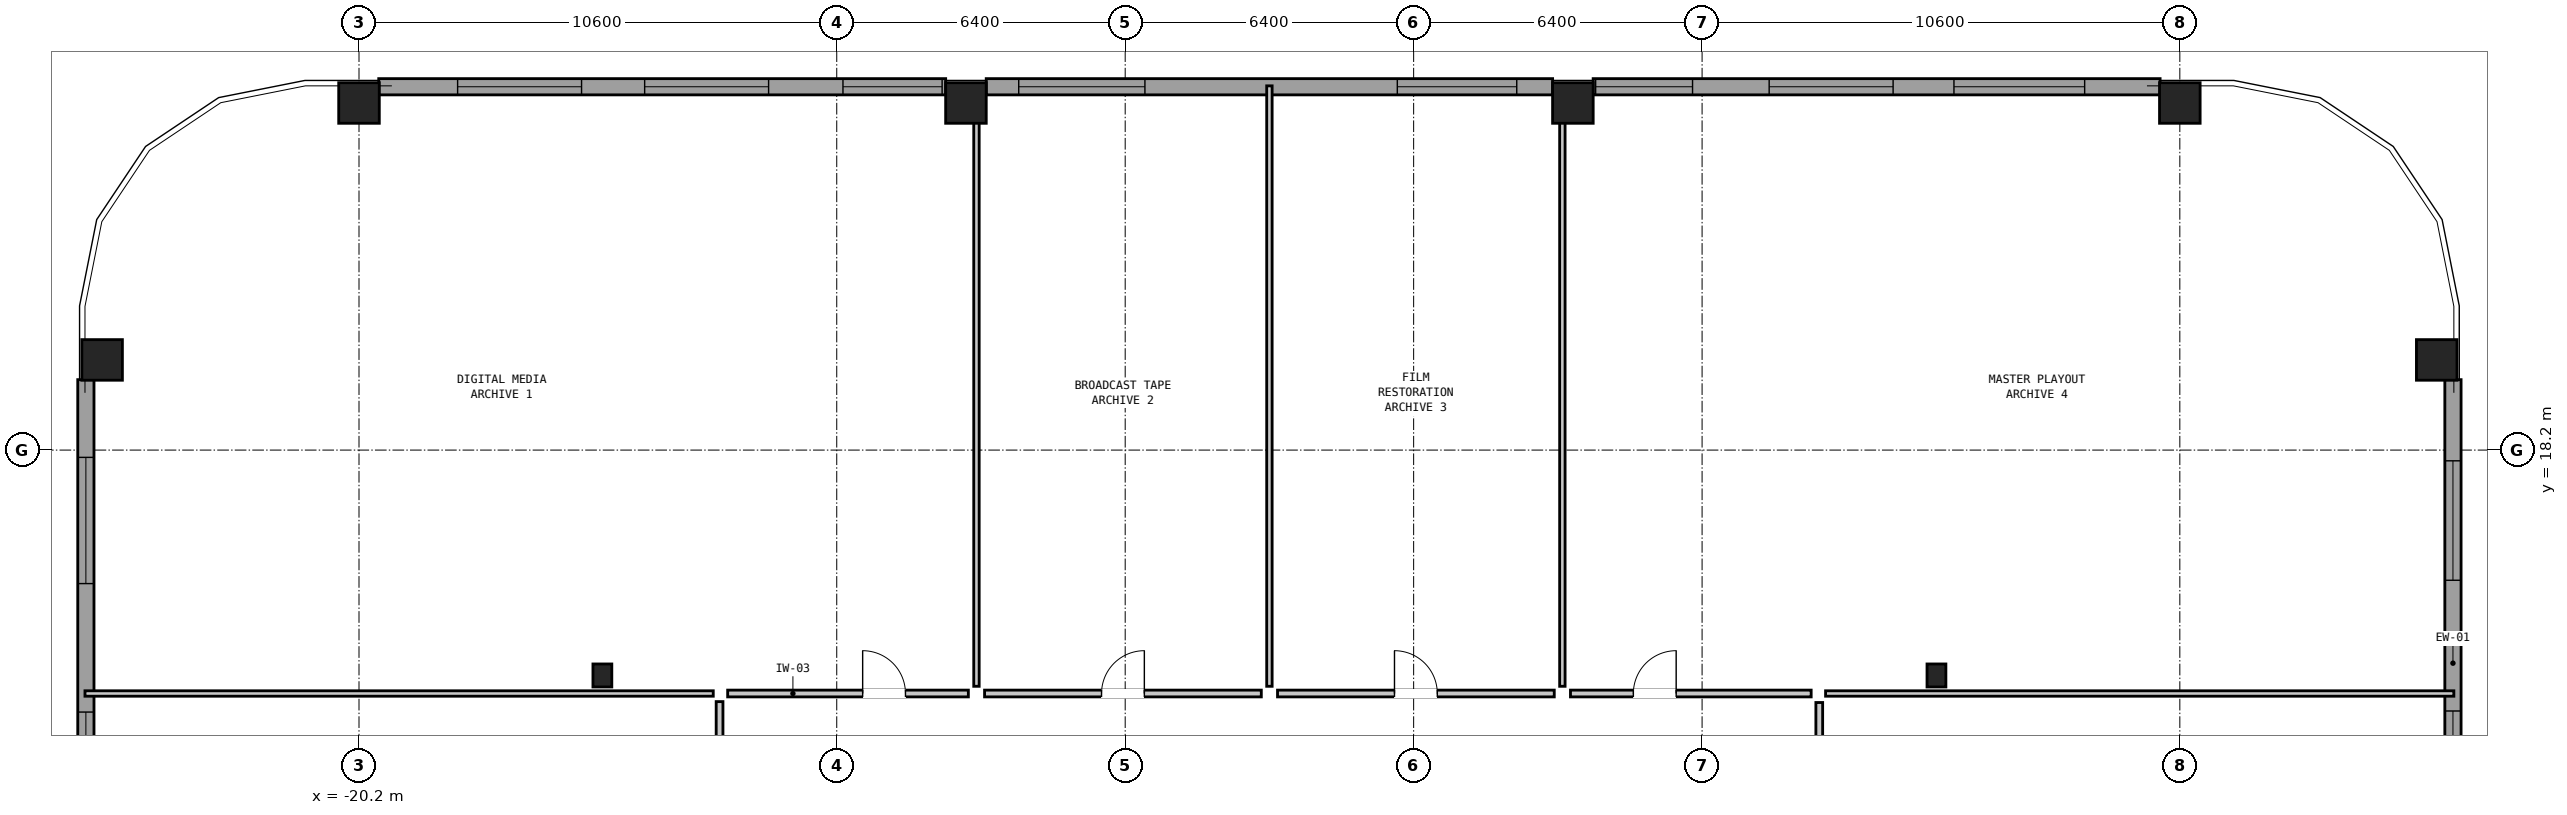
"""IFC4 building model, lengths in metres.
Left out: names, types, materials, properties, quantities, classifications, styles, units other than length and angle.
Written with IfcOpenShell. Run it as: python <this file> out.ifc"""

import sys

from ifc_helpers import new_model, si_unit, direction, frame, frame_2d, origin, origin_2d, place, context, subcontext, project, spatial, rectangle, hollow_rectangle, i_section, extrude, element, fill, save


model = new_model("IFC4")
c1 = context("Model", 3, precision=1e-05, world=origin(), true_north=direction((0.0, 1.0)))
c2 = subcontext(c1, "Body", "Model", "MODEL_VIEW")
j1 = project(units=[si_unit("LENGTHUNIT", "METRE"), si_unit("PLANEANGLEUNIT", "RADIAN")], contexts=[c1])
p1 = place(None, origin())
s1 = spatial("IfcSite", under=j1, at=p1, CompositionType="ELEMENT")
p2 = place(p1, origin())
s2 = spatial("IfcBuilding", under=s1, at=p2, CompositionType="ELEMENT")
p3 = place(p2, frame((0.0, 0.0, 47.45)))
s3 = spatial("IfcBuildingStorey", under=s2, at=p3, CompositionType="ELEMENT", Elevation=47.45)
for number, where, z_axis, x_axis in (
    (1, (25.9, 20.2, 0.0), (0.0, 0.0, 1.0), (0.0, 1.0, 0.0)),
    (2, (20.2, 25.9, 0.0), (0.0, 0.0, 1.0), (1.0, 0.0, 0.0)),
    (3, (6.733, 25.9, 0.0), (0.0, 0.0, 1.0), (1.0, 0.0, 0.0)),
    (4, (-6.733, 25.9, 0.0), (0.0, 0.0, 1.0), (1.0, 0.0, 0.0)),
    (5, (-20.2, 25.9, 0.0), (0.0, 0.0, 1.0), (1.0, 0.0, 0.0)),
    (6, (-25.9, 20.2, 0.0), (0.0, 0.0, 1.0), (0.0, 1.0, 0.0)),
):
    element("IfcColumn", number, at=place(p3, frame(where, z_axis=z_axis, x_axis=x_axis)), inside=s3, PredefinedType="COLUMN", context=c2, shape_type="SweptSolid", body=[
        extrude(hollow_rectangle(XDim=0.9, YDim=0.9, WallThickness=0.055, at=origin_2d()), origin(), (0.0, 0.0, 1.0), 3.05),
    ])
for number, where, z_axis, x_axis in (
    (7, (-14.8, 13.2, 0.0), (0.0, 0.0, 1.0), (1.0, 0.0, 0.0)),
    (8, (14.8, 13.2, 0.0), (0.0, 0.0, 1.0), (1.0, 0.0, 0.0)),
):
    element("IfcColumn", number, at=place(p3, frame(where, z_axis=z_axis, x_axis=x_axis)), inside=s3, PredefinedType="COLUMN", context=c2, shape_type="SweptSolid", body=[
        extrude(i_section(OverallWidth=0.418, OverallDepth=0.51, WebThickness=0.042, FlangeThickness=0.068, at=origin_2d()), origin(), (0.0, 0.0, 1.0), 3.05),
    ])
p4 = place(p3, frame((26.26, 19.762, 0.0), z_axis=(0.0, 0.0, 1.0), x_axis=(0.0, -1.0, 0.0)))
e9 = element("IfcWall", 9, at=p4, inside=s3, PredefinedType="SOLIDWALL", context=c2, shape_type="SweptSolid", body=[
    extrude(rectangle(XDim=12.579, YDim=0.36, at=frame_2d((6.289, 0.0))), origin(), (0.0, 0.0, 1.0), 2.067),
])
p5 = place(p4, frame((1.8, 0.0, 0.2)))
e10 = element("IfcOpeningElement", 10, at=p5, cuts=e9, PredefinedType="OPENING", context=c2, shape_type="SweptSolid", body=[
    extrude(rectangle(XDim=2.65, YDim=1.05, at=frame_2d((1.325, 0.525))), frame((0.0, 0.192, 0.0), z_axis=(0.0, -1.0, 0.0), x_axis=(1.0, 0.0, 0.0)), (0.0, 0.0, 1.0), 0.384),
])
p6 = place(p4, frame((7.35, 0.0, 0.9)))
e11 = element("IfcOpeningElement", 11, at=p6, cuts=e9, PredefinedType="OPENING", context=c2, shape_type="SweptSolid", body=[
    extrude(rectangle(XDim=1.35, YDim=1.0, at=frame_2d((0.675, 0.5))), frame((0.0, 0.192, 0.0), z_axis=(0.0, -1.0, 0.0), x_axis=(1.0, 0.0, 0.0)), (0.0, 0.0, 1.0), 0.384),
])
p7 = place(p4, frame((10.35, 0.0, 0.2)))
e12 = element("IfcOpeningElement", 12, at=p7, cuts=e9, PredefinedType="OPENING", context=c2, shape_type="SweptSolid", body=[
    extrude(rectangle(XDim=2.15, YDim=1.2, at=frame_2d((1.075, 0.6))), frame((0.0, 0.192, 0.0), z_axis=(0.0, -1.0, 0.0), x_axis=(1.0, 0.0, 0.0)), (0.0, 0.0, 1.0), 0.384),
])
p8 = place(p3, frame((-19.762, 26.26, 0.0), z_axis=(0.0, 0.0, 1.0), x_axis=(1.0, 0.0, 0.0)))
e13 = element("IfcWall", 13, at=p8, inside=s3, PredefinedType="SOLIDWALL", context=c2, shape_type="SweptSolid", body=[
    extrude(rectangle(XDim=12.579, YDim=0.36, at=frame_2d((6.289, 0.0))), origin(), (0.0, 0.0, 1.0), 2.067),
])
p9 = place(p8, frame((1.75, 0.0, 0.2)))
e14 = element("IfcOpeningElement", 14, at=p9, cuts=e13, PredefinedType="OPENING", context=c2, shape_type="SweptSolid", body=[
    extrude(rectangle(XDim=2.75, YDim=0.95, at=frame_2d((1.375, 0.475))), frame((0.0, 0.192, 0.0), z_axis=(0.0, -1.0, 0.0), x_axis=(1.0, 0.0, 0.0)), (0.0, 0.0, 1.0), 0.384),
])
p10 = place(p8, frame((5.9, 0.0, 0.95)))
e15 = element("IfcOpeningElement", 15, at=p10, cuts=e13, PredefinedType="OPENING", context=c2, shape_type="SweptSolid", body=[
    extrude(rectangle(XDim=2.75, YDim=0.95, at=frame_2d((1.375, 0.475))), frame((0.0, 0.192, 0.0), z_axis=(0.0, -1.0, 0.0), x_axis=(1.0, 0.0, 0.0)), (0.0, 0.0, 1.0), 0.384),
])
p11 = place(p8, frame((10.3, 0.0, 0.2)))
e16 = element("IfcOpeningElement", 16, at=p11, cuts=e13, PredefinedType="OPENING", context=c2, shape_type="SweptSolid", body=[
    extrude(rectangle(XDim=2.2, YDim=1.1, at=frame_2d((1.1, 0.55))), frame((0.0, 0.192, 0.0), z_axis=(0.0, -1.0, 0.0), x_axis=(1.0, 0.0, 0.0)), (0.0, 0.0, 1.0), 0.384),
])
p12 = place(p3, frame((-6.283, 26.26, 0.0), z_axis=(0.0, 0.0, 1.0), x_axis=(1.0, 0.0, 0.0)))
e17 = element("IfcWall", 17, at=p12, inside=s3, PredefinedType="SOLIDWALL", context=c2, shape_type="SweptSolid", body=[
    extrude(rectangle(XDim=12.566, YDim=0.36, at=frame_2d((6.283, 0.0))), origin(), (0.0, 0.0, 1.0), 2.067),
])
p13 = place(p12, frame((0.721, 0.0, 0.95)))
e18 = element("IfcOpeningElement", 18, at=p13, cuts=e17, PredefinedType="OPENING", context=c2, shape_type="SweptSolid", body=[
    extrude(rectangle(XDim=2.8, YDim=0.95, at=frame_2d((1.4, 0.475))), frame((0.0, 0.192, 0.0), z_axis=(0.0, -1.0, 0.0), x_axis=(1.0, 0.0, 0.0)), (0.0, 0.0, 1.0), 0.384),
])
p14 = place(p12, frame((9.121, 0.0, 0.9)))
e19 = element("IfcOpeningElement", 19, at=p14, cuts=e17, PredefinedType="OPENING", context=c2, shape_type="SweptSolid", body=[
    extrude(rectangle(XDim=2.65, YDim=1.0, at=frame_2d((1.325, 0.5))), frame((0.0, 0.192, 0.0), z_axis=(0.0, -1.0, 0.0), x_axis=(1.0, 0.0, 0.0)), (0.0, 0.0, 1.0), 0.384),
])
p15 = place(p3, frame((7.183, 26.26, 0.0), z_axis=(0.0, 0.0, 1.0), x_axis=(1.0, 0.0, 0.0)))
e20 = element("IfcWall", 20, at=p15, inside=s3, PredefinedType="SOLIDWALL", context=c2, shape_type="SweptSolid", body=[
    extrude(rectangle(XDim=12.579, YDim=0.36, at=frame_2d((6.289, 0.0))), origin(), (0.0, 0.0, 1.0), 2.067),
])
p16 = place(p15, frame((0.055, 0.0, 0.2)))
e21 = element("IfcOpeningElement", 21, at=p16, cuts=e20, PredefinedType="OPENING", context=c2, shape_type="SweptSolid", body=[
    extrude(rectangle(XDim=2.15, YDim=1.15, at=frame_2d((1.075, 0.575))), frame((0.0, 0.192, 0.0), z_axis=(0.0, -1.0, 0.0), x_axis=(1.0, 0.0, 0.0)), (0.0, 0.0, 1.0), 0.384),
])
p17 = place(p15, frame((3.905, 0.0, 0.95)))
e22 = element("IfcOpeningElement", 22, at=p17, cuts=e20, PredefinedType="OPENING", context=c2, shape_type="SweptSolid", body=[
    extrude(rectangle(XDim=2.75, YDim=0.95, at=frame_2d((1.375, 0.475))), frame((0.0, 0.192, 0.0), z_axis=(0.0, -1.0, 0.0), x_axis=(1.0, 0.0, 0.0)), (0.0, 0.0, 1.0), 0.384),
])
p18 = place(p15, frame((8.005, 0.0, 0.2)))
e23 = element("IfcOpeningElement", 23, at=p18, cuts=e20, PredefinedType="OPENING", context=c2, shape_type="SweptSolid", body=[
    extrude(rectangle(XDim=2.9, YDim=0.9, at=frame_2d((1.45, 0.45))), frame((0.0, 0.192, 0.0), z_axis=(0.0, -1.0, 0.0), x_axis=(1.0, 0.0, 0.0)), (0.0, 0.0, 1.0), 0.384),
])
p19 = place(p3, frame((-26.26, 7.183, 0.0), z_axis=(0.0, 0.0, 1.0), x_axis=(0.0, 1.0, 0.0)))
e24 = element("IfcWall", 24, at=p19, inside=s3, PredefinedType="SOLIDWALL", context=c2, shape_type="SweptSolid", body=[
    extrude(rectangle(XDim=12.579, YDim=0.36, at=frame_2d((6.289, 0.0))), origin(), (0.0, 0.0, 1.0), 2.067),
])
p20 = place(p19, frame((0.055, 0.0, 0.2)))
e25 = element("IfcOpeningElement", 25, at=p20, cuts=e24, PredefinedType="OPENING", context=c2, shape_type="SweptSolid", body=[
    extrude(rectangle(XDim=2.25, YDim=1.15, at=frame_2d((1.125, 0.575))), frame((0.0, 0.192, 0.0), z_axis=(0.0, -1.0, 0.0), x_axis=(1.0, 0.0, 0.0)), (0.0, 0.0, 1.0), 0.384),
])
p21 = place(p19, frame((3.805, 0.0, 0.95)))
e26 = element("IfcOpeningElement", 26, at=p21, cuts=e24, PredefinedType="OPENING", context=c2, shape_type="SweptSolid", body=[
    extrude(rectangle(XDim=1.4, YDim=0.95, at=frame_2d((0.7, 0.475))), frame((0.0, 0.192, 0.0), z_axis=(0.0, -1.0, 0.0), x_axis=(1.0, 0.0, 0.0)), (0.0, 0.0, 1.0), 0.384),
])
p22 = place(p19, frame((8.055, 0.0, 0.2)))
e27 = element("IfcOpeningElement", 27, at=p22, cuts=e24, PredefinedType="OPENING", context=c2, shape_type="SweptSolid", body=[
    extrude(rectangle(XDim=2.8, YDim=1.0, at=frame_2d((1.4, 0.5))), frame((0.0, 0.192, 0.0), z_axis=(0.0, -1.0, 0.0), x_axis=(1.0, 0.0, 0.0)), (0.0, 0.0, 1.0), 0.384),
])
for number, where, z_axis, x_axis in (
    (28, (-26.28, 12.8, 0.0), (0.0, 0.0, 1.0), (1.0, 0.0, 0.0)),
    (29, (12.34, 12.8, 0.0), (0.0, 0.0, 1.0), (1.0, 0.0, 0.0)),
):
    element("IfcWall", number, at=place(p3, frame(where, z_axis=z_axis, x_axis=x_axis)), inside=s3, PredefinedType="PARTITIONING", context=c2, shape_type="SweptSolid", body=[
        extrude(rectangle(XDim=13.94, YDim=0.12, at=frame_2d((6.97, 0.0))), origin(), (0.0, 0.0, 1.0), 2.83),
    ])
for number, where, z_axis, x_axis in (
    (30, (-6.5, 12.96, 0.0), (0.0, 0.0, 1.0), (0.0, 1.0, 0.0)),
    (31, (0.0, 12.96, 0.0), (0.0, 0.0, 1.0), (0.0, 1.0, 0.0)),
    (32, (6.5, 12.96, 0.0), (0.0, 0.0, 1.0), (0.0, 1.0, 0.0)),
):
    element("IfcWall", number, at=place(p3, frame(where, z_axis=z_axis, x_axis=x_axis)), inside=s3, PredefinedType="PARTITIONING", context=c2, shape_type="SweptSolid", body=[
        extrude(rectangle(XDim=13.32, YDim=0.12, at=frame_2d((6.66, 0.0))), origin(), (0.0, 0.0, 1.0), 2.274),
    ])
p23 = place(p3, frame((-12.02, 12.8, 0.0), z_axis=(0.0, 0.0, 1.0), x_axis=(1.0, 0.0, 0.0)))
e33 = element("IfcWall", 33, at=p23, inside=s3, PredefinedType="PARTITIONING", context=c2, shape_type="SweptSolid", body=[
    extrude(rectangle(XDim=5.34, YDim=0.15, at=frame_2d((2.67, 0.0))), origin(), (0.0, 0.0, 1.0), 2.83),
])
p24 = place(p23, frame((2.995, 0.0, 0.0)))
e34 = element("IfcOpeningElement", 34, at=p24, cuts=e33, PredefinedType="OPENING", context=c2, shape_type="SweptSolid", body=[
    extrude(rectangle(XDim=0.95, YDim=2.1, at=frame_2d((0.475, 1.05))), frame((0.0, 0.087, 0.0), z_axis=(0.0, -1.0, 0.0), x_axis=(1.0, 0.0, 0.0)), (0.0, 0.0, 1.0), 0.174),
])
p25 = place(p3, frame((-6.32, 12.8, 0.0), z_axis=(0.0, 0.0, 1.0), x_axis=(1.0, 0.0, 0.0)))
e35 = element("IfcWall", 35, at=p25, inside=s3, PredefinedType="PARTITIONING", context=c2, shape_type="SweptSolid", body=[
    extrude(rectangle(XDim=6.14, YDim=0.15, at=frame_2d((3.07, 0.0))), origin(), (0.0, 0.0, 1.0), 2.83),
])
p26 = place(p25, frame((2.595, 0.0, 0.0)))
e36 = element("IfcOpeningElement", 36, at=p26, cuts=e35, PredefinedType="OPENING", context=c2, shape_type="SweptSolid", body=[
    extrude(rectangle(XDim=0.95, YDim=2.1, at=frame_2d((0.475, 1.05))), frame((0.0, 0.087, 0.0), z_axis=(0.0, -1.0, 0.0), x_axis=(1.0, 0.0, 0.0)), (0.0, 0.0, 1.0), 0.174),
])
p27 = place(p3, frame((0.18, 12.8, 0.0), z_axis=(0.0, 0.0, 1.0), x_axis=(1.0, 0.0, 0.0)))
e37 = element("IfcWall", 37, at=p27, inside=s3, PredefinedType="PARTITIONING", context=c2, shape_type="SweptSolid", body=[
    extrude(rectangle(XDim=6.14, YDim=0.15, at=frame_2d((3.07, 0.0))), origin(), (0.0, 0.0, 1.0), 2.83),
])
p28 = place(p27, frame((2.595, 0.0, 0.0)))
e38 = element("IfcOpeningElement", 38, at=p28, cuts=e37, PredefinedType="OPENING", context=c2, shape_type="SweptSolid", body=[
    extrude(rectangle(XDim=0.95, YDim=2.1, at=frame_2d((0.475, 1.05))), frame((0.0, 0.087, 0.0), z_axis=(0.0, -1.0, 0.0), x_axis=(1.0, 0.0, 0.0)), (0.0, 0.0, 1.0), 0.174),
])
p29 = place(p3, frame((6.68, 12.8, 0.0), z_axis=(0.0, 0.0, 1.0), x_axis=(1.0, 0.0, 0.0)))
e39 = element("IfcWall", 39, at=p29, inside=s3, PredefinedType="PARTITIONING", context=c2, shape_type="SweptSolid", body=[
    extrude(rectangle(XDim=5.34, YDim=0.15, at=frame_2d((2.67, 0.0))), origin(), (0.0, 0.0, 1.0), 2.83),
])
p30 = place(p29, frame((1.395, 0.0, 0.0)))
e40 = element("IfcOpeningElement", 40, at=p30, cuts=e39, PredefinedType="OPENING", context=c2, shape_type="SweptSolid", body=[
    extrude(rectangle(XDim=0.95, YDim=2.1, at=frame_2d((0.475, 1.05))), frame((0.0, 0.087, 0.0), z_axis=(0.0, -1.0, 0.0), x_axis=(1.0, 0.0, 0.0)), (0.0, 0.0, 1.0), 0.174),
])
p31 = place(p3, frame((-12.2, 3.68, 0.0), z_axis=(0.0, 0.0, 1.0), x_axis=(0.0, 1.0, 0.0)))
e41 = element("IfcWall", 41, at=p31, inside=s3, PredefinedType="PARTITIONING", context=c2, shape_type="SweptSolid", body=[
    extrude(rectangle(XDim=8.94, YDim=0.15, at=frame_2d((4.47, 0.0))), origin(), (0.0, 0.0, 1.0), 2.83),
])
p32 = place(p31, frame((3.995, 0.0, 0.0)))
e42 = element("IfcOpeningElement", 42, at=p32, cuts=e41, PredefinedType="OPENING", context=c2, shape_type="SweptSolid", body=[
    extrude(rectangle(XDim=0.95, YDim=2.1, at=frame_2d((0.475, 1.05))), frame((0.0, 0.087, 0.0), z_axis=(0.0, -1.0, 0.0), x_axis=(1.0, 0.0, 0.0)), (0.0, 0.0, 1.0), 0.174),
])
p33 = place(p3, frame((12.2, 3.8, 0.0), z_axis=(0.0, 0.0, 1.0), x_axis=(0.0, 1.0, 0.0)))
e43 = element("IfcWall", 43, at=p33, inside=s3, PredefinedType="PARTITIONING", context=c2, shape_type="SweptSolid", body=[
    extrude(rectangle(XDim=8.8, YDim=0.15, at=frame_2d((4.4, 0.0))), origin(), (0.0, 0.0, 1.0), 2.83),
])
p34 = place(p33, frame((3.925, 0.0, 0.0)))
e44 = element("IfcOpeningElement", 44, at=p34, cuts=e43, PredefinedType="OPENING", context=c2, shape_type="SweptSolid", body=[
    extrude(rectangle(XDim=0.95, YDim=2.1, at=frame_2d((0.475, 1.05))), frame((0.0, 0.087, 0.0), z_axis=(0.0, -1.0, 0.0), x_axis=(1.0, 0.0, 0.0)), (0.0, 0.0, 1.0), 0.174),
])
p35 = place(p5, origin())
e45 = element("IfcWindow", 45, at=p35, inside=s3, PartitioningType="SINGLE_PANEL", PredefinedType="WINDOW", context=c2, shape_type="SweptSolid", body=[
    extrude(rectangle(XDim=2.65, YDim=1.05, at=frame_2d((1.325, 0.525))), frame((0.0, 0.03, 0.0), z_axis=(0.0, -1.0, 0.0), x_axis=(1.0, 0.0, 0.0)), (0.0, 0.0, 1.0), 0.06),
])
fill(e10, e45)
p36 = place(p6, origin())
e46 = element("IfcWindow", 46, at=p36, inside=s3, PartitioningType="SINGLE_PANEL", PredefinedType="WINDOW", context=c2, shape_type="SweptSolid", body=[
    extrude(rectangle(XDim=1.35, YDim=1.0, at=frame_2d((0.675, 0.5))), frame((0.0, 0.03, 0.0), z_axis=(0.0, -1.0, 0.0), x_axis=(1.0, 0.0, 0.0)), (0.0, 0.0, 1.0), 0.06),
])
fill(e11, e46)
p37 = place(p9, origin())
e47 = element("IfcWindow", 47, at=p37, inside=s3, PartitioningType="SINGLE_PANEL", PredefinedType="WINDOW", context=c2, shape_type="SweptSolid", body=[
    extrude(rectangle(XDim=2.75, YDim=0.95, at=frame_2d((1.375, 0.475))), frame((0.0, 0.03, 0.0), z_axis=(0.0, -1.0, 0.0), x_axis=(1.0, 0.0, 0.0)), (0.0, 0.0, 1.0), 0.06),
])
fill(e14, e47)
p38 = place(p10, origin())
e48 = element("IfcWindow", 48, at=p38, inside=s3, PartitioningType="SINGLE_PANEL", PredefinedType="WINDOW", context=c2, shape_type="SweptSolid", body=[
    extrude(rectangle(XDim=2.75, YDim=0.95, at=frame_2d((1.375, 0.475))), frame((0.0, 0.03, 0.0), z_axis=(0.0, -1.0, 0.0), x_axis=(1.0, 0.0, 0.0)), (0.0, 0.0, 1.0), 0.06),
])
fill(e15, e48)
p39 = place(p11, origin())
e49 = element("IfcWindow", 49, at=p39, inside=s3, PartitioningType="SINGLE_PANEL", PredefinedType="WINDOW", context=c2, shape_type="SweptSolid", body=[
    extrude(rectangle(XDim=2.2, YDim=1.1, at=frame_2d((1.1, 0.55))), frame((0.0, 0.03, 0.0), z_axis=(0.0, -1.0, 0.0), x_axis=(1.0, 0.0, 0.0)), (0.0, 0.0, 1.0), 0.06),
])
fill(e16, e49)
p40 = place(p13, origin())
e50 = element("IfcWindow", 50, at=p40, inside=s3, PartitioningType="SINGLE_PANEL", PredefinedType="WINDOW", context=c2, shape_type="SweptSolid", body=[
    extrude(rectangle(XDim=2.8, YDim=0.95, at=frame_2d((1.4, 0.475))), frame((0.0, 0.03, 0.0), z_axis=(0.0, -1.0, 0.0), x_axis=(1.0, 0.0, 0.0)), (0.0, 0.0, 1.0), 0.06),
])
fill(e18, e50)
p41 = place(p14, origin())
e51 = element("IfcWindow", 51, at=p41, inside=s3, PartitioningType="SINGLE_PANEL", PredefinedType="WINDOW", context=c2, shape_type="SweptSolid", body=[
    extrude(rectangle(XDim=2.65, YDim=1.0, at=frame_2d((1.325, 0.5))), frame((0.0, 0.03, 0.0), z_axis=(0.0, -1.0, 0.0), x_axis=(1.0, 0.0, 0.0)), (0.0, 0.0, 1.0), 0.06),
])
fill(e19, e51)
p42 = place(p16, origin())
e52 = element("IfcWindow", 52, at=p42, inside=s3, PartitioningType="SINGLE_PANEL", PredefinedType="WINDOW", context=c2, shape_type="SweptSolid", body=[
    extrude(rectangle(XDim=2.15, YDim=1.15, at=frame_2d((1.075, 0.575))), frame((0.0, 0.03, 0.0), z_axis=(0.0, -1.0, 0.0), x_axis=(1.0, 0.0, 0.0)), (0.0, 0.0, 1.0), 0.06),
])
fill(e21, e52)
p43 = place(p17, origin())
e53 = element("IfcWindow", 53, at=p43, inside=s3, PartitioningType="SINGLE_PANEL", PredefinedType="WINDOW", context=c2, shape_type="SweptSolid", body=[
    extrude(rectangle(XDim=2.75, YDim=0.95, at=frame_2d((1.375, 0.475))), frame((0.0, 0.03, 0.0), z_axis=(0.0, -1.0, 0.0), x_axis=(1.0, 0.0, 0.0)), (0.0, 0.0, 1.0), 0.06),
])
fill(e22, e53)
p44 = place(p18, origin())
e54 = element("IfcWindow", 54, at=p44, inside=s3, PartitioningType="SINGLE_PANEL", PredefinedType="WINDOW", context=c2, shape_type="SweptSolid", body=[
    extrude(rectangle(XDim=2.9, YDim=0.9, at=frame_2d((1.45, 0.45))), frame((0.0, 0.03, 0.0), z_axis=(0.0, -1.0, 0.0), x_axis=(1.0, 0.0, 0.0)), (0.0, 0.0, 1.0), 0.06),
])
fill(e23, e54)
p45 = place(p21, origin())
e55 = element("IfcWindow", 55, at=p45, inside=s3, PartitioningType="SINGLE_PANEL", PredefinedType="WINDOW", context=c2, shape_type="SweptSolid", body=[
    extrude(rectangle(XDim=1.4, YDim=0.95, at=frame_2d((0.7, 0.475))), frame((0.0, 0.03, 0.0), z_axis=(0.0, -1.0, 0.0), x_axis=(1.0, 0.0, 0.0)), (0.0, 0.0, 1.0), 0.06),
])
fill(e26, e55)
p46 = place(p22, origin())
e56 = element("IfcWindow", 56, at=p46, inside=s3, PartitioningType="SINGLE_PANEL", PredefinedType="WINDOW", context=c2, shape_type="SweptSolid", body=[
    extrude(rectangle(XDim=2.8, YDim=1.0, at=frame_2d((1.4, 0.5))), frame((0.0, 0.03, 0.0), z_axis=(0.0, -1.0, 0.0), x_axis=(1.0, 0.0, 0.0)), (0.0, 0.0, 1.0), 0.06),
])
fill(e27, e56)
p47 = place(p24, origin())
e57 = element("IfcDoor", 57, at=p47, inside=s3, OperationType="SINGLE_SWING_LEFT", PredefinedType="DOOR", context=c2, shape_type="SweptSolid", body=[
    extrude(rectangle(XDim=0.95, YDim=2.1, at=frame_2d((0.475, 1.05))), frame((0.0, 0.025, 0.0), z_axis=(0.0, -1.0, 0.0), x_axis=(1.0, 0.0, 0.0)), (0.0, 0.0, 1.0), 0.05),
])
fill(e34, e57)
p48 = place(p26, origin())
e58 = element("IfcDoor", 58, at=p48, inside=s3, OperationType="SINGLE_SWING_RIGHT", PredefinedType="DOOR", context=c2, shape_type="SweptSolid", body=[
    extrude(rectangle(XDim=0.95, YDim=2.1, at=frame_2d((0.475, 1.05))), frame((0.0, 0.025, 0.0), z_axis=(0.0, -1.0, 0.0), x_axis=(1.0, 0.0, 0.0)), (0.0, 0.0, 1.0), 0.05),
])
fill(e36, e58)
p49 = place(p28, origin())
e59 = element("IfcDoor", 59, at=p49, inside=s3, OperationType="SINGLE_SWING_LEFT", PredefinedType="DOOR", context=c2, shape_type="SweptSolid", body=[
    extrude(rectangle(XDim=0.95, YDim=2.1, at=frame_2d((0.475, 1.05))), frame((0.0, 0.025, 0.0), z_axis=(0.0, -1.0, 0.0), x_axis=(1.0, 0.0, 0.0)), (0.0, 0.0, 1.0), 0.05),
])
fill(e38, e59)
p50 = place(p30, origin())
e60 = element("IfcDoor", 60, at=p50, inside=s3, OperationType="SINGLE_SWING_RIGHT", PredefinedType="DOOR", context=c2, shape_type="SweptSolid", body=[
    extrude(rectangle(XDim=0.95, YDim=2.1, at=frame_2d((0.475, 1.05))), frame((0.0, 0.025, 0.0), z_axis=(0.0, -1.0, 0.0), x_axis=(1.0, 0.0, 0.0)), (0.0, 0.0, 1.0), 0.05),
])
fill(e40, e60)
save(model, sys.argv[1])
